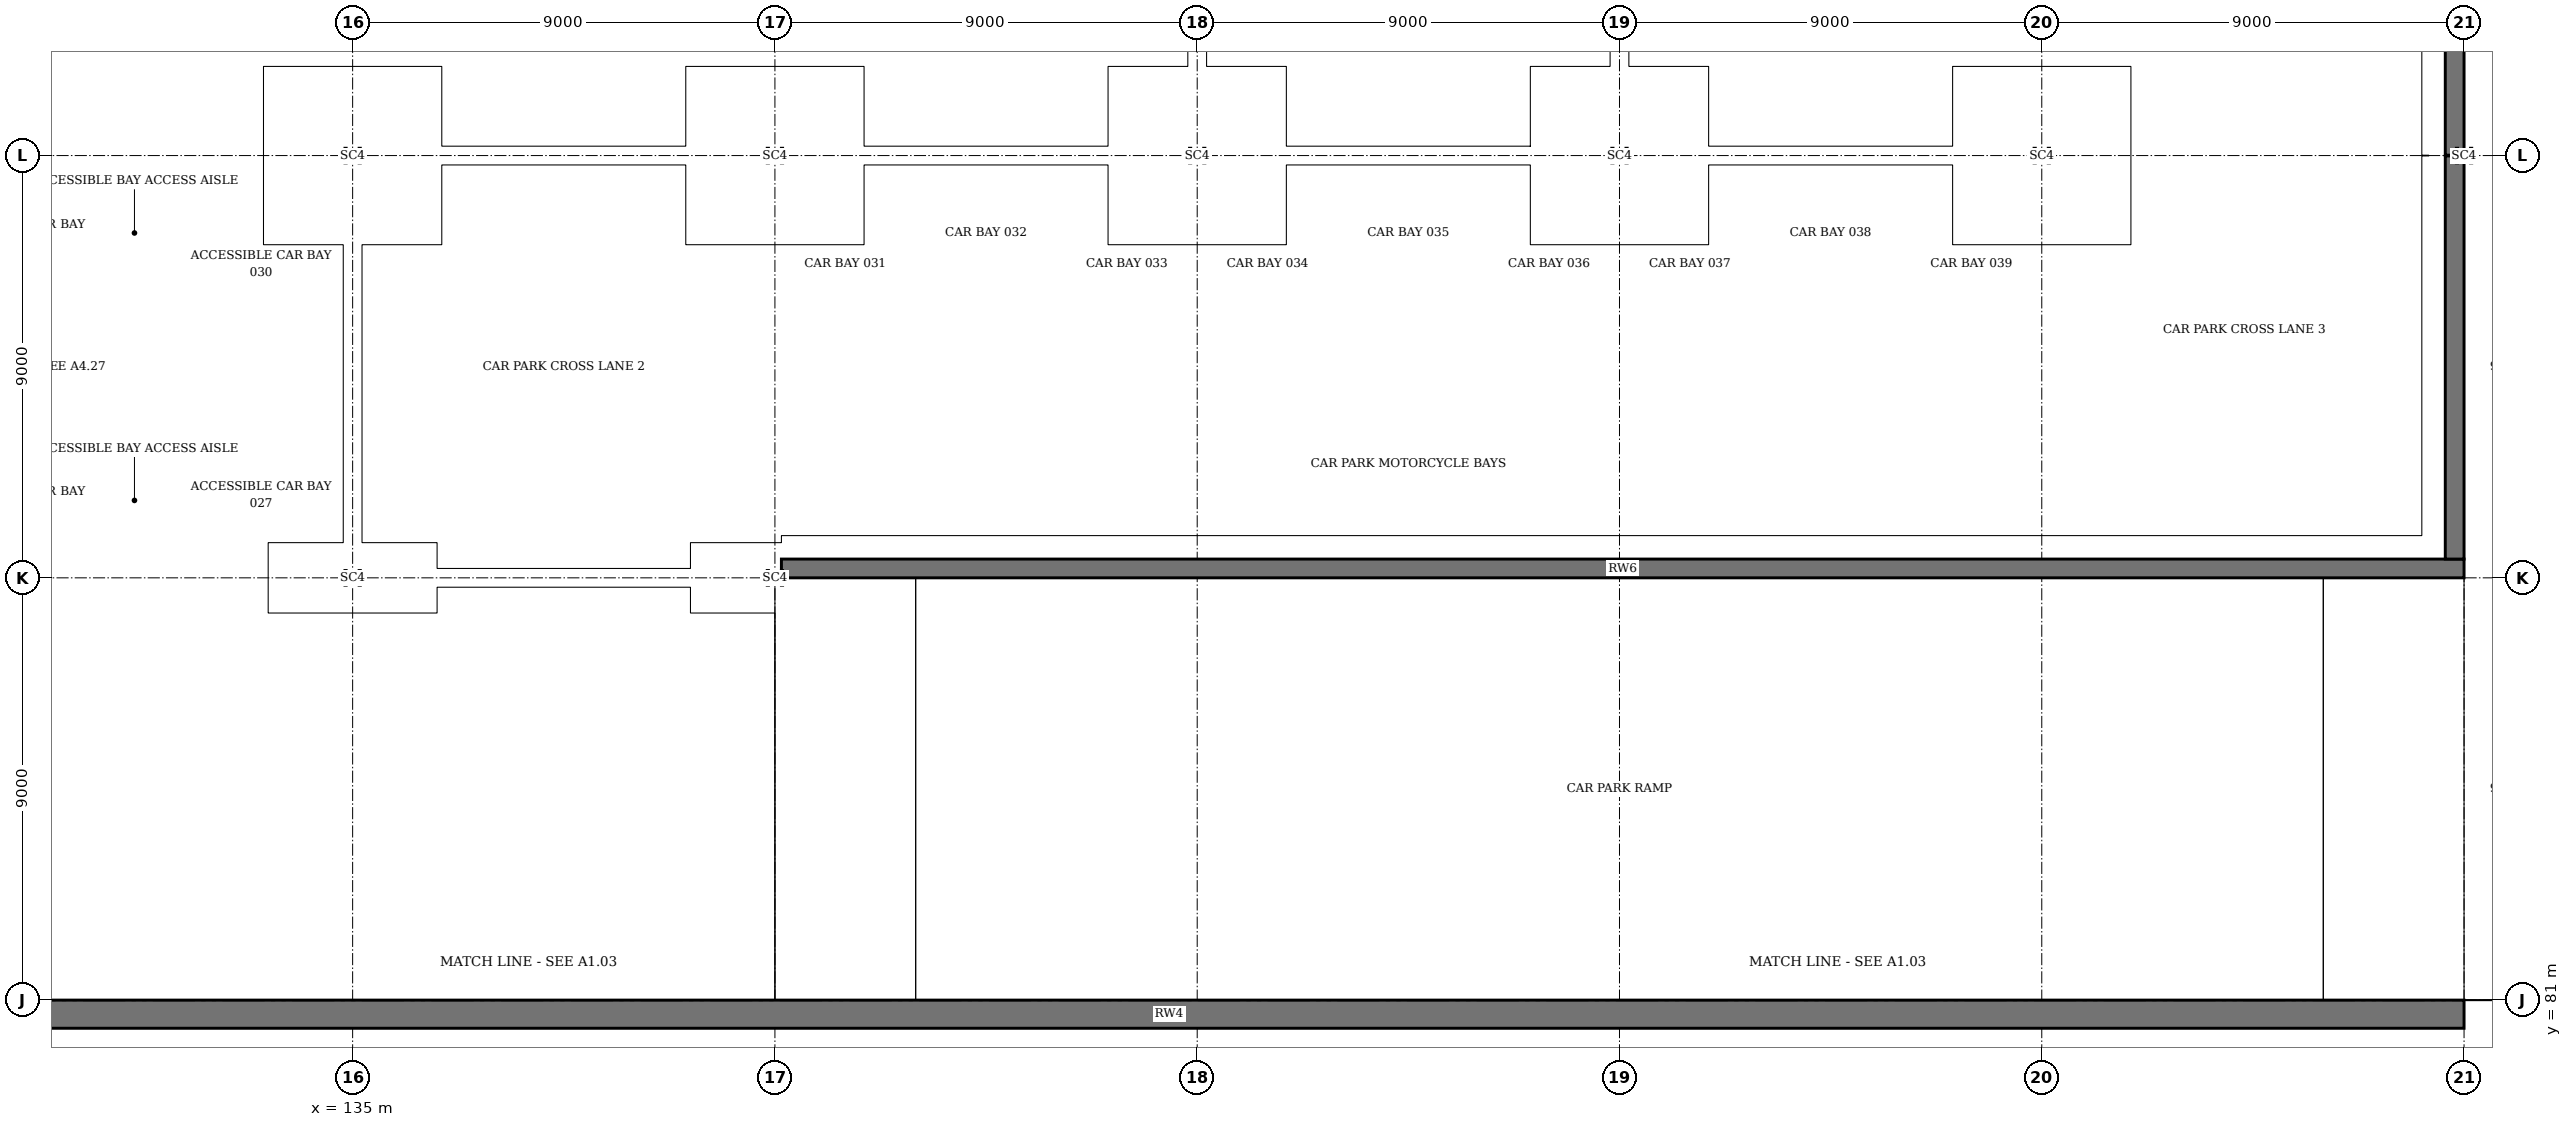
"""IFC4 building model, lengths in metres.
Left out: names, types, materials, properties, quantities, classifications, styles, units other than length and angle.
Written with IfcOpenShell. Run it as: python <this file> out.ifc"""

import sys

from ifc_helpers import new_model, si_unit, direction, frame, frame_2d, origin, origin_2d, place, context, subcontext, project, spatial, rectangle, i_section, extrude, element, save


model = new_model("IFC4")
c1 = context("Model", 3, precision=1e-05, world=origin(), true_north=direction((0.0, 1.0)))
c2 = subcontext(c1, "Body", "Model", "MODEL_VIEW")
j1 = project(units=[si_unit("LENGTHUNIT", "METRE"), si_unit("PLANEANGLEUNIT", "RADIAN")], contexts=[c1])
p1 = place(None, origin())
s1 = spatial("IfcSite", under=j1, at=p1, CompositionType="ELEMENT")
p2 = place(p1, origin())
s2 = spatial("IfcBuilding", under=s1, at=p2, CompositionType="ELEMENT")
p3 = place(p2, frame((0.0, 0.0, -4.5)))
s3 = spatial("IfcBuildingStorey", under=s2, at=p3, CompositionType="ELEMENT", Elevation=-4.5)
for number, where, z_axis, x_axis in (
    (1, (135.0, 90.0, 0.0), (0.0, 0.0, 1.0), (0.0, 1.0, 0.0)),
    (2, (135.0, 99.0, 0.0), (0.0, 0.0, 1.0), (0.0, 1.0, 0.0)),
    (3, (144.0, 90.0, 0.0), (0.0, 0.0, 1.0), (0.0, 1.0, 0.0)),
    (4, (144.0, 99.0, 0.0), (0.0, 0.0, 1.0), (0.0, 1.0, 0.0)),
    (5, (153.0, 99.0, 0.0), (0.0, 0.0, 1.0), (0.0, 1.0, 0.0)),
    (6, (162.0, 99.0, 0.0), (0.0, 0.0, 1.0), (0.0, 1.0, 0.0)),
    (7, (171.0, 99.0, 0.0), (0.0, 0.0, 1.0), (0.0, 1.0, 0.0)),
    (8, (180.0, 99.0, 0.0), (0.0, 0.0, 1.0), (0.0, 1.0, 0.0)),
):
    element("IfcColumn", number, at=place(p3, frame(where, z_axis=z_axis, x_axis=x_axis)), inside=s3, PredefinedType="COLUMN", context=c2, shape_type="SweptSolid", body=[
        extrude(i_section(OverallWidth=0.311, OverallDepth=0.327, WebThickness=0.016, FlangeThickness=0.025, at=origin_2d()), origin(), (0.0, 0.0, 1.0), 4.5),
    ])
p4 = place(p3, frame((0.0, 80.7, 0.0), z_axis=(0.0, 0.0, 1.0), x_axis=(1.0, 0.0, 0.0)))
e9 = element("IfcWall", 9, at=p4, inside=s3, PredefinedType="SHEAR", context=c2, shape_type="SweptSolid", body=[
    extrude(rectangle(XDim=180.0, YDim=0.6, at=frame_2d((90.0, 0.0))), origin(), (0.0, 0.0, 1.0), 4.5),
])
p5 = place(p3, frame((144.138, 90.2, 0.0), z_axis=(0.0, 0.0, 1.0), x_axis=(1.0, 0.0, 0.0)))
e10 = element("IfcWall", 10, at=p5, inside=s3, PredefinedType="SOLIDWALL", context=c2, shape_type="SweptSolid", body=[
    extrude(rectangle(XDim=35.862, YDim=0.4, at=frame_2d((17.931, 0.0))), origin(), (0.0, 0.0, 1.0), 4.5),
])
p6 = place(p3, frame((179.8, 90.4, 0.0), z_axis=(0.0, 0.0, 1.0), x_axis=(0.0, 1.0, 0.0)))
e11 = element("IfcWall", 11, at=p6, inside=s3, PredefinedType="SOLIDWALL", context=c2, shape_type="SweptSolid", body=[
    extrude(rectangle(XDim=8.592, YDim=0.4, at=frame_2d((4.296, 0.0))), origin(), (0.0, 0.0, 1.0), 4.5),
])
p7 = place(p3, frame((179.8, 99.008, 0.0), z_axis=(0.0, 0.0, 1.0), x_axis=(0.0, 1.0, 0.0)))
e12 = element("IfcWall", 12, at=p7, inside=s3, PredefinedType="SOLIDWALL", context=c2, shape_type="SweptSolid", body=[
    extrude(rectangle(XDim=8.992, YDim=0.4, at=frame_2d((4.496, 0.0))), origin(), (0.0, 0.0, 1.0), 4.5),
])
save(model, sys.argv[1])
